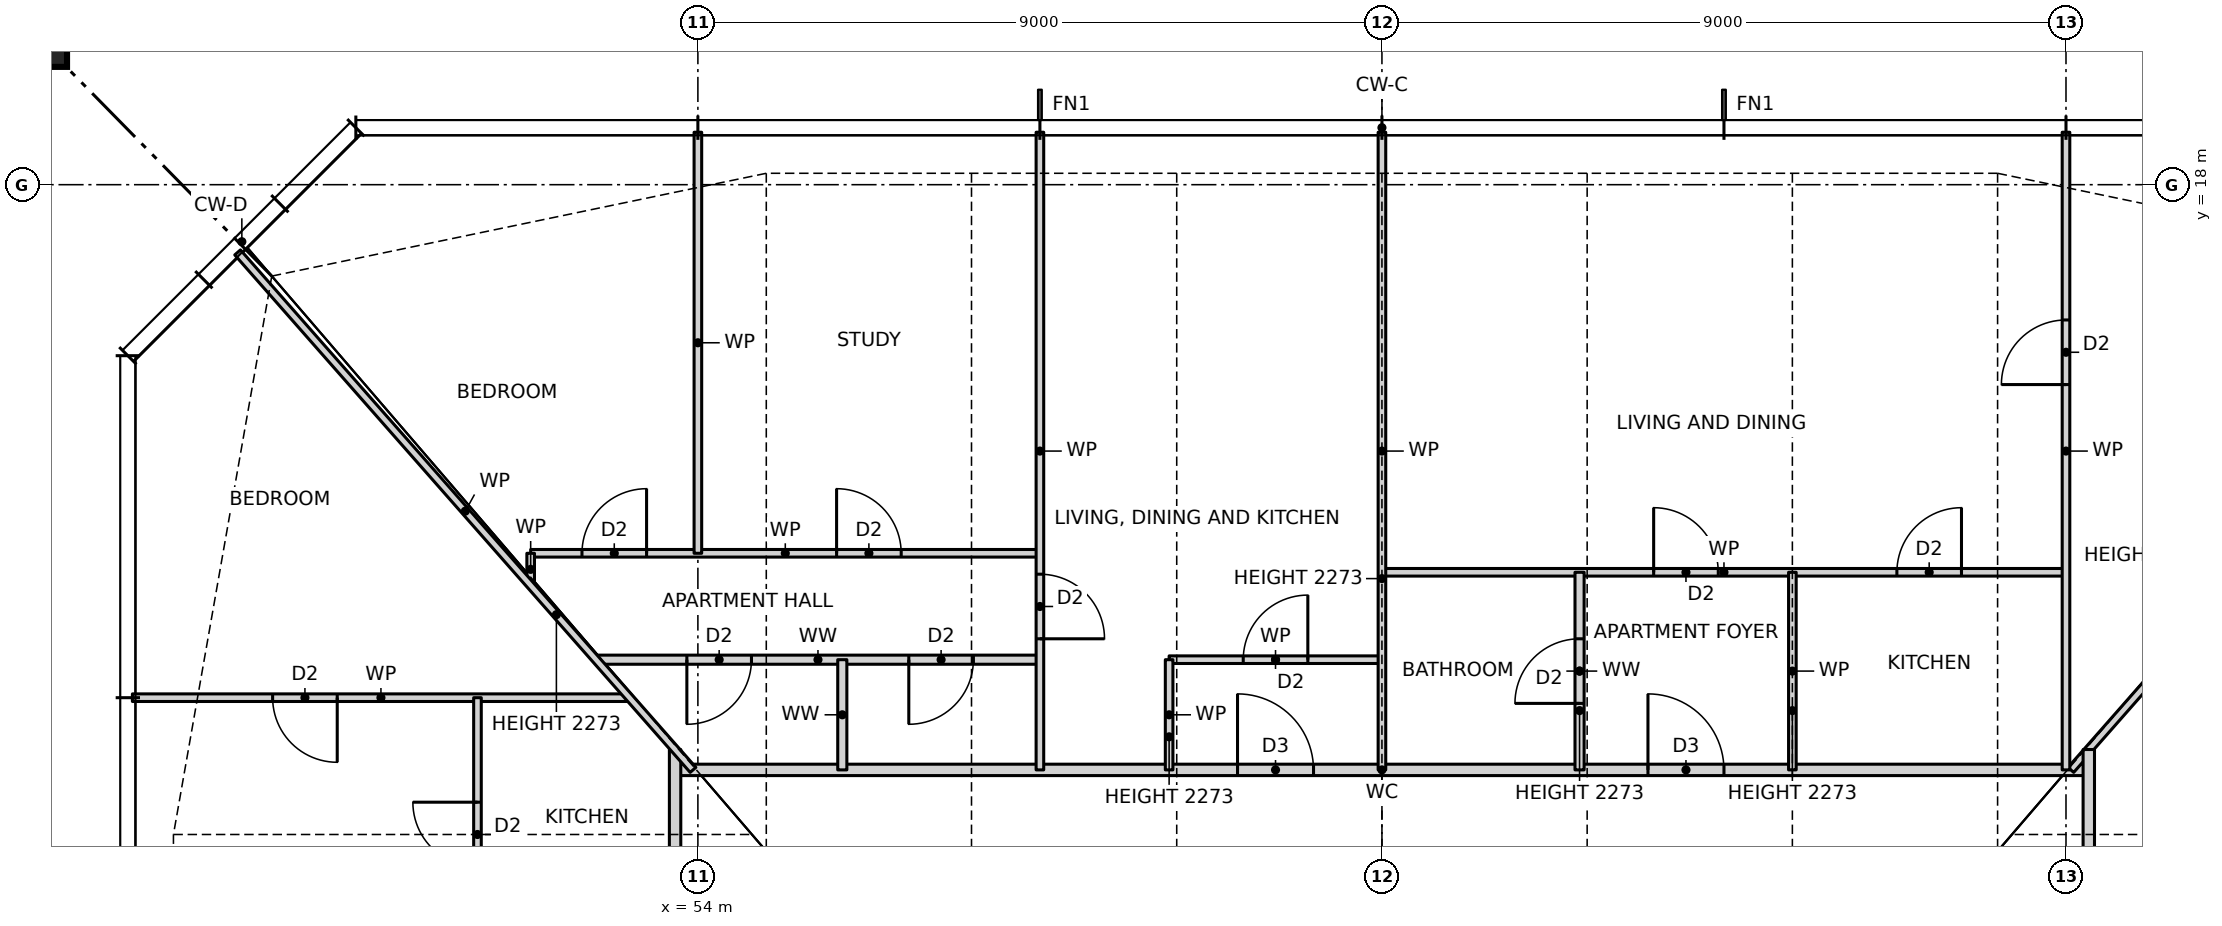
"""IFC4 building model, lengths in metres.
Left out: names, types, materials, properties, quantities, classifications, styles, units other than length and angle.
Written with IfcOpenShell. Run it as: python <this file> out.ifc"""

import sys

from ifc_helpers import new_model, si_unit, direction, frame, frame_2d, origin, origin_2d, place, context, subcontext, project, spatial, rectangle, hollow_rectangle, extrude, element, fill, save


model = new_model("IFC4")
c1 = context("Model", 3, precision=1e-05, world=origin(), true_north=direction((0.0, 1.0)))
c2 = subcontext(c1, "Body", "Model", "MODEL_VIEW")
j1 = project(units=[si_unit("LENGTHUNIT", "METRE"), si_unit("PLANEANGLEUNIT", "RADIAN")], contexts=[c1])
p1 = place(None, origin())
s1 = spatial("IfcSite", under=j1, at=p1, CompositionType="ELEMENT")
p2 = place(p1, origin())
s2 = spatial("IfcBuilding", under=s1, at=p2, CompositionType="ELEMENT")
p3 = place(p2, frame((0.0, 0.0, 71.0)))
s3 = spatial("IfcBuildingStorey", under=s2, at=p3, CompositionType="ELEMENT", Elevation=71.0)
p4 = place(p3, frame((45.1, 20.15, 0.0), z_axis=(0.0, 0.0, 1.0), x_axis=(1.0, 0.0, 0.0)))
e1 = element("IfcColumn", 1, at=p4, inside=s3, PredefinedType="COLUMN", context=c2, shape_type="SweptSolid", body=[
    extrude(hollow_rectangle(XDim=1.2, YDim=1.2, WallThickness=0.07, at=origin_2d()), origin(), (0.0, 0.0, 1.0), 3.5),
])
p5 = place(p3, frame((53.7, 10.3, 0.0), z_axis=(0.0, 0.0, 1.0), x_axis=(1.0, 0.0, 0.0)))
e2 = element("IfcWall", 2, at=p5, inside=s3, PredefinedType="PARTITIONING", context=c2, shape_type="SweptSolid", body=[
    extrude(rectangle(XDim=18.6, YDim=0.15, at=frame_2d((9.3, 0.0))), origin(), (0.0, 0.0, 1.0), 3.2),
])
p6 = place(p5, frame((12.8, 0.0, 0.0)))
e3 = element("IfcOpeningElement", 3, at=p6, cuts=e2, PredefinedType="OPENING", context=c2, shape_type="SweptSolid", body=[
    extrude(rectangle(XDim=1.0, YDim=2.1, at=frame_2d((0.5, 1.05))), frame((0.0, 0.085, 0.0), z_axis=(0.0, -1.0, 0.0), x_axis=(1.0, 0.0, 0.0)), (0.0, 0.0, 1.0), 0.17),
])
p7 = place(p5, frame((7.4, 0.0, 0.0)))
e4 = element("IfcOpeningElement", 4, at=p7, cuts=e2, PredefinedType="OPENING", context=c2, shape_type="SweptSolid", body=[
    extrude(rectangle(XDim=1.0, YDim=2.1, at=frame_2d((0.5, 1.05))), frame((0.0, 0.085, 0.0), z_axis=(0.0, -1.0, 0.0), x_axis=(1.0, 0.0, 0.0)), (0.0, 0.0, 1.0), 0.17),
])
p8 = place(p3, frame((46.56, 11.25, 0.0), z_axis=(0.0, 0.0, 1.0), x_axis=(1.0, 0.0, 0.0)))
e5 = element("IfcWall", 5, at=p8, inside=s3, PredefinedType="PARTITIONING", context=c2, shape_type="SweptSolid", body=[
    extrude(rectangle(XDim=6.54, YDim=0.1, at=frame_2d((3.27, 0.0))), origin(), (0.0, 0.0, 1.0), 3.2),
])
p9 = place(p8, frame((1.845, 0.0, 0.0)))
e6 = element("IfcOpeningElement", 6, at=p9, cuts=e5, PredefinedType="OPENING", context=c2, shape_type="SweptSolid", body=[
    extrude(rectangle(XDim=0.85, YDim=2.1, at=frame_2d((0.425, 1.05))), frame((0.0, 0.06, 0.0), z_axis=(0.0, -1.0, 0.0), x_axis=(1.0, 0.0, 0.0)), (0.0, 0.0, 1.0), 0.12),
])
p10 = place(p3, frame((52.66, 11.75, 0.0), z_axis=(0.0, 0.0, 1.0), x_axis=(1.0, 0.0, 0.0)))
e7 = element("IfcWall", 7, at=p10, inside=s3, PredefinedType="PARTITIONING", context=c2, shape_type="SweptSolid", body=[
    extrude(rectangle(XDim=5.84, YDim=0.12, at=frame_2d((2.92, 0.0))), origin(), (0.0, 0.0, 1.0), 3.2),
])
p11 = place(p10, frame((4.115, 0.0, 0.0)))
e8 = element("IfcOpeningElement", 8, at=p11, cuts=e7, PredefinedType="OPENING", context=c2, shape_type="SweptSolid", body=[
    extrude(rectangle(XDim=0.85, YDim=2.1, at=frame_2d((0.425, 1.05))), frame((0.0, 0.07, 0.0), z_axis=(0.0, -1.0, 0.0), x_axis=(1.0, 0.0, 0.0)), (0.0, 0.0, 1.0), 0.14),
])
p12 = place(p10, frame((1.195, 0.0, 0.0)))
e9 = element("IfcOpeningElement", 9, at=p12, cuts=e7, PredefinedType="OPENING", context=c2, shape_type="SweptSolid", body=[
    extrude(rectangle(XDim=0.85, YDim=2.1, at=frame_2d((0.425, 1.05))), frame((0.0, 0.07, 0.0), z_axis=(0.0, -1.0, 0.0), x_axis=(1.0, 0.0, 0.0)), (0.0, 0.0, 1.0), 0.14),
])
p13 = place(p3, frame((60.2, 11.75, 0.0), z_axis=(0.0, 0.0, 1.0), x_axis=(1.0, 0.0, 0.0)))
e10 = element("IfcWall", 10, at=p13, inside=s3, PredefinedType="PARTITIONING", context=c2, shape_type="SweptSolid", body=[
    extrude(rectangle(XDim=2.8, YDim=0.1, at=frame_2d((1.4, 0.0))), origin(), (0.0, 0.0, 1.0), 3.2),
])
p14 = place(p13, frame((0.975, 0.0, 0.0)))
e11 = element("IfcOpeningElement", 11, at=p14, cuts=e10, PredefinedType="OPENING", context=c2, shape_type="SweptSolid", body=[
    extrude(rectangle(XDim=0.85, YDim=2.1, at=frame_2d((0.425, 1.05))), frame((0.0, 0.06, 0.0), z_axis=(0.0, -1.0, 0.0), x_axis=(1.0, 0.0, 0.0)), (0.0, 0.0, 1.0), 0.12),
])
p15 = place(p3, frame((63.0, 12.9, 0.0), z_axis=(0.0, 0.0, 1.0), x_axis=(1.0, 0.0, 0.0)))
e12 = element("IfcWall", 12, at=p15, inside=s3, PredefinedType="PARTITIONING", context=c2, shape_type="SweptSolid", body=[
    extrude(rectangle(XDim=9.0, YDim=0.1, at=frame_2d((4.5, 0.0))), origin(), (0.0, 0.0, 1.0), 3.2),
])
p16 = place(p15, frame((6.775, 0.0, 0.0)))
e13 = element("IfcOpeningElement", 13, at=p16, cuts=e12, PredefinedType="OPENING", context=c2, shape_type="SweptSolid", body=[
    extrude(rectangle(XDim=0.85, YDim=2.1, at=frame_2d((0.425, 1.05))), frame((0.0, 0.06, 0.0), z_axis=(0.0, -1.0, 0.0), x_axis=(1.0, 0.0, 0.0)), (0.0, 0.0, 1.0), 0.12),
])
p17 = place(p15, frame((3.575, 0.0, 0.0)))
e14 = element("IfcOpeningElement", 14, at=p17, cuts=e12, PredefinedType="OPENING", context=c2, shape_type="SweptSolid", body=[
    extrude(rectangle(XDim=0.85, YDim=2.1, at=frame_2d((0.425, 1.05))), frame((0.0, 0.06, 0.0), z_axis=(0.0, -1.0, 0.0), x_axis=(1.0, 0.0, 0.0)), (0.0, 0.0, 1.0), 0.12),
])
p18 = place(p3, frame((51.8, 13.15, 0.0), z_axis=(0.0, 0.0, 1.0), x_axis=(1.0, 0.0, 0.0)))
e15 = element("IfcWall", 15, at=p18, inside=s3, PredefinedType="PARTITIONING", context=c2, shape_type="SweptSolid", body=[
    extrude(rectangle(XDim=6.7, YDim=0.1, at=frame_2d((3.35, 0.0))), origin(), (0.0, 0.0, 1.0), 3.2),
])
p19 = place(p18, frame((4.025, 0.0, 0.0)))
e16 = element("IfcOpeningElement", 16, at=p19, cuts=e15, PredefinedType="OPENING", context=c2, shape_type="SweptSolid", body=[
    extrude(rectangle(XDim=0.85, YDim=2.1, at=frame_2d((0.425, 1.05))), frame((0.0, 0.06, 0.0), z_axis=(0.0, -1.0, 0.0), x_axis=(1.0, 0.0, 0.0)), (0.0, 0.0, 1.0), 0.12),
])
p20 = place(p18, frame((0.675, 0.0, 0.0)))
e17 = element("IfcOpeningElement", 17, at=p20, cuts=e15, PredefinedType="OPENING", context=c2, shape_type="SweptSolid", body=[
    extrude(rectangle(XDim=0.85, YDim=2.1, at=frame_2d((0.425, 1.05))), frame((0.0, 0.06, 0.0), z_axis=(0.0, -1.0, 0.0), x_axis=(1.0, 0.0, 0.0)), (0.0, 0.0, 1.0), 0.12),
])
p21 = place(p3, frame((72.064, 10.3, 0.0), z_axis=(0.0, 0.0, 1.0), x_axis=(0.660700699661, 0.750649442461, 0.0)))
e18 = element("IfcWall", 18, at=p21, inside=s3, PredefinedType="PARTITIONING", context=c2, shape_type="SweptSolid", body=[
    extrude(rectangle(XDim=9.071, YDim=0.1, at=frame_2d((4.535, 0.0))), origin(), (0.0, 0.0, 1.0), 2.273),
])
p22 = place(p3, frame((72.3, -10.568, 0.0), z_axis=(0.0, 0.0, 1.0), x_axis=(0.0, 1.0, 0.0)))
e19 = element("IfcWall", 19, at=p22, inside=s3, PredefinedType="PARTITIONING", context=c2, shape_type="SweptSolid", body=[
    extrude(rectangle(XDim=21.136, YDim=0.15, at=frame_2d((10.568, 0.0))), origin(), (0.0, 0.0, 1.0), 3.2),
])
p23 = place(p22, frame((10.068, 0.0, 0.0)))
e20 = element("IfcOpeningElement", 20, at=p23, cuts=e19, PredefinedType="OPENING", context=c2, shape_type="SweptSolid", body=[
    extrude(rectangle(XDim=1.0, YDim=2.1, at=frame_2d((0.5, 1.05))), frame((0.0, 0.085, 0.0), z_axis=(0.0, -1.0, 0.0), x_axis=(1.0, 0.0, 0.0)), (0.0, 0.0, 1.0), 0.17),
])
p24 = place(p3, frame((72.0, 10.3, 0.0), z_axis=(0.0, 0.0, 1.0), x_axis=(0.0, 1.0, 0.0)))
e21 = element("IfcWall", 21, at=p24, inside=s3, PredefinedType="PARTITIONING", context=c2, shape_type="SweptSolid", body=[
    extrude(rectangle(XDim=8.39, YDim=0.1, at=frame_2d((4.195, 0.0))), origin(), (0.0, 0.0, 1.0), 3.2),
])
p25 = place(p24, frame((5.07, 0.0, 0.0)))
e22 = element("IfcOpeningElement", 22, at=p25, cuts=e21, PredefinedType="OPENING", context=c2, shape_type="SweptSolid", body=[
    extrude(rectangle(XDim=0.85, YDim=2.1, at=frame_2d((0.425, 1.05))), frame((0.0, 0.06, 0.0), z_axis=(0.0, -1.0, 0.0), x_axis=(1.0, 0.0, 0.0)), (0.0, 0.0, 1.0), 0.12),
])
p26 = place(p3, frame((68.4, 10.3, 0.0), z_axis=(0.0, 0.0, 1.0), x_axis=(0.0, 1.0, 0.0)))
e23 = element("IfcWall", 23, at=p26, inside=s3, PredefinedType="PARTITIONING", context=c2, shape_type="SweptSolid", body=[
    extrude(rectangle(XDim=2.6, YDim=0.1, at=frame_2d((1.3, 0.0))), origin(), (0.0, 0.0, 1.0), 2.273),
])
p27 = place(p3, frame((65.6, 10.3, 0.0), z_axis=(0.0, 0.0, 1.0), x_axis=(0.0, 1.0, 0.0)))
e24 = element("IfcWall", 24, at=p27, inside=s3, PredefinedType="PARTITIONING", context=c2, shape_type="SweptSolid", body=[
    extrude(rectangle(XDim=2.6, YDim=0.12, at=frame_2d((1.3, 0.0))), origin(), (0.0, 0.0, 1.0), 2.273),
])
p28 = place(p27, frame((0.875, 0.0, 0.0)))
e25 = element("IfcOpeningElement", 25, at=p28, cuts=e24, PredefinedType="OPENING", context=c2, shape_type="SweptSolid", body=[
    extrude(rectangle(XDim=0.85, YDim=2.1, at=frame_2d((0.425, 1.05))), frame((0.0, 0.07, 0.0), z_axis=(0.0, -1.0, 0.0), x_axis=(1.0, 0.0, 0.0)), (0.0, 0.0, 1.0), 0.14),
])
p29 = place(p3, frame((63.0, 10.3, 0.0), z_axis=(0.0, 0.0, 1.0), x_axis=(0.0, 1.0, 0.0)))
e26 = element("IfcWall", 26, at=p29, inside=s3, PredefinedType="PARTITIONING", context=c2, shape_type="SweptSolid", body=[
    extrude(rectangle(XDim=8.39, YDim=0.1, at=frame_2d((4.195, 0.0))), origin(), (0.0, 0.0, 1.0), 2.273),
])
p30 = place(p3, frame((60.2, 10.3, 0.0), z_axis=(0.0, 0.0, 1.0), x_axis=(0.0, 1.0, 0.0)))
e27 = element("IfcWall", 27, at=p30, inside=s3, PredefinedType="PARTITIONING", context=c2, shape_type="SweptSolid", body=[
    extrude(rectangle(XDim=1.45, YDim=0.1, at=frame_2d((0.725, 0.0))), origin(), (0.0, 0.0, 1.0), 2.273),
])
p31 = place(p3, frame((58.5, 10.3, 0.0), z_axis=(0.0, 0.0, 1.0), x_axis=(0.0, 1.0, 0.0)))
e28 = element("IfcWall", 28, at=p31, inside=s3, PredefinedType="PARTITIONING", context=c2, shape_type="SweptSolid", body=[
    extrude(rectangle(XDim=8.39, YDim=0.1, at=frame_2d((4.195, 0.0))), origin(), (0.0, 0.0, 1.0), 3.2),
])
p32 = place(p31, frame((1.725, 0.0, 0.0)))
e29 = element("IfcOpeningElement", 29, at=p32, cuts=e28, PredefinedType="OPENING", context=c2, shape_type="SweptSolid", body=[
    extrude(rectangle(XDim=0.85, YDim=2.1, at=frame_2d((0.425, 1.05))), frame((0.0, 0.06, 0.0), z_axis=(0.0, -1.0, 0.0), x_axis=(1.0, 0.0, 0.0)), (0.0, 0.0, 1.0), 0.12),
])
p33 = place(p3, frame((55.9, 10.3, 0.0), z_axis=(0.0, 0.0, 1.0), x_axis=(0.0, 1.0, 0.0)))
e30 = element("IfcWall", 30, at=p33, inside=s3, PredefinedType="PARTITIONING", context=c2, shape_type="SweptSolid", body=[
    extrude(rectangle(XDim=1.45, YDim=0.12, at=frame_2d((0.725, 0.0))), origin(), (0.0, 0.0, 1.0), 3.2),
])
p34 = place(p3, frame((54.0, 13.15, 0.0), z_axis=(0.0, 0.0, 1.0), x_axis=(0.0, 1.0, 0.0)))
e31 = element("IfcWall", 31, at=p34, inside=s3, PredefinedType="PARTITIONING", context=c2, shape_type="SweptSolid", body=[
    extrude(rectangle(XDim=5.54, YDim=0.1, at=frame_2d((2.77, 0.0))), origin(), (0.0, 0.0, 1.0), 3.2),
])
p35 = place(p3, frame((53.7, -10.568, 0.0), z_axis=(0.0, 0.0, 1.0), x_axis=(0.0, 1.0, 0.0)))
e32 = element("IfcWall", 32, at=p35, inside=s3, PredefinedType="PARTITIONING", context=c2, shape_type="SweptSolid", body=[
    extrude(rectangle(XDim=21.136, YDim=0.15, at=frame_2d((10.568, 0.0))), origin(), (0.0, 0.0, 1.0), 3.2),
])
p36 = place(p35, frame((16.318, 0.0, 0.0)))
e33 = element("IfcOpeningElement", 33, at=p36, cuts=e32, PredefinedType="OPENING", context=c2, shape_type="SweptSolid", body=[
    extrude(rectangle(XDim=1.0, YDim=2.1, at=frame_2d((0.5, 1.05))), frame((0.0, 0.085, 0.0), z_axis=(0.0, -1.0, 0.0), x_axis=(1.0, 0.0, 0.0)), (0.0, 0.0, 1.0), 0.17),
])
p37 = place(p35, frame((10.918, 0.0, 0.0)))
e34 = element("IfcOpeningElement", 34, at=p37, cuts=e32, PredefinedType="OPENING", context=c2, shape_type="SweptSolid", body=[
    extrude(rectangle(XDim=1.0, YDim=2.1, at=frame_2d((0.5, 1.05))), frame((0.0, 0.085, 0.0), z_axis=(0.0, -1.0, 0.0), x_axis=(1.0, 0.0, 0.0)), (0.0, 0.0, 1.0), 0.17),
])
p38 = place(p3, frame((51.8, 12.727, 0.0), z_axis=(0.0, 0.0, 1.0), x_axis=(0.0, 1.0, 0.0)))
e35 = element("IfcWall", 35, at=p38, inside=s3, PredefinedType="PARTITIONING", context=c2, shape_type="SweptSolid", body=[
    extrude(rectangle(XDim=0.423, YDim=0.1, at=frame_2d((0.211, 0.0))), origin(), (0.0, 0.0, 1.0), 3.2),
])
p39 = place(p3, frame((51.1, 2.25, 0.0), z_axis=(0.0, 0.0, 1.0), x_axis=(0.0, 1.0, 0.0)))
e36 = element("IfcWall", 36, at=p39, inside=s3, PredefinedType="PARTITIONING", context=c2, shape_type="SweptSolid", body=[
    extrude(rectangle(XDim=9.0, YDim=0.1, at=frame_2d((4.5, 0.0))), origin(), (0.0, 0.0, 1.0), 3.2),
])
p40 = place(p39, frame((6.775, 0.0, 0.0)))
e37 = element("IfcOpeningElement", 37, at=p40, cuts=e36, PredefinedType="OPENING", context=c2, shape_type="SweptSolid", body=[
    extrude(rectangle(XDim=0.85, YDim=2.1, at=frame_2d((0.425, 1.05))), frame((0.0, 0.06, 0.0), z_axis=(0.0, -1.0, 0.0), x_axis=(1.0, 0.0, 0.0)), (0.0, 0.0, 1.0), 0.12),
])
p41 = place(p39, frame((3.575, 0.0, 0.0)))
e38 = element("IfcOpeningElement", 38, at=p41, cuts=e36, PredefinedType="OPENING", context=c2, shape_type="SweptSolid", body=[
    extrude(rectangle(XDim=0.85, YDim=2.1, at=frame_2d((0.425, 1.05))), frame((0.0, 0.06, 0.0), z_axis=(0.0, -1.0, 0.0), x_axis=(1.0, 0.0, 0.0)), (0.0, 0.0, 1.0), 0.12),
])
p42 = place(p3, frame((53.936, 10.3, 0.0), z_axis=(0.0, 0.0, 1.0), x_axis=(-0.660638210404, 0.750704439146, 0.0)))
e39 = element("IfcWall", 39, at=p42, inside=s3, PredefinedType="PARTITIONING", context=c2, shape_type="SweptSolid", body=[
    extrude(rectangle(XDim=9.07, YDim=0.1, at=frame_2d((4.535, 0.0))), origin(), (0.0, 0.0, 1.0), 2.273),
])
p43 = place(p16, origin())
e40 = element("IfcDoor", 40, at=p43, inside=s3, OperationType="SINGLE_SWING_RIGHT", PredefinedType="DOOR", context=c2, shape_type="SweptSolid", body=[
    extrude(rectangle(XDim=0.85, YDim=2.1, at=frame_2d((0.425, 1.05))), frame((0.0, 0.025, 0.0), z_axis=(0.0, -1.0, 0.0), x_axis=(1.0, 0.0, 0.0)), (0.0, 0.0, 1.0), 0.05),
])
fill(e13, e40)
p44 = place(p6, origin())
e41 = element("IfcDoor", 41, at=p44, inside=s3, OperationType="SINGLE_SWING_LEFT", PredefinedType="DOOR", context=c2, shape_type="SweptSolid", body=[
    extrude(rectangle(XDim=1.0, YDim=2.1, at=frame_2d((0.5, 1.05))), frame((0.0, 0.025, 0.0), z_axis=(0.0, -1.0, 0.0), x_axis=(1.0, 0.0, 0.0)), (0.0, 0.0, 1.0), 0.05),
])
fill(e3, e41)
p45 = place(p17, origin())
e42 = element("IfcDoor", 42, at=p45, inside=s3, OperationType="SINGLE_SWING_LEFT", PredefinedType="DOOR", context=c2, shape_type="SweptSolid", body=[
    extrude(rectangle(XDim=0.85, YDim=2.1, at=frame_2d((0.425, 1.05))), frame((0.0, 0.025, 0.0), z_axis=(0.0, -1.0, 0.0), x_axis=(1.0, 0.0, 0.0)), (0.0, 0.0, 1.0), 0.05),
])
fill(e14, e42)
p46 = place(p28, origin())
e43 = element("IfcDoor", 43, at=p46, inside=s3, OperationType="SINGLE_SWING_LEFT", PredefinedType="DOOR", context=c2, shape_type="SweptSolid", body=[
    extrude(rectangle(XDim=0.85, YDim=2.1, at=frame_2d((0.425, 1.05))), frame((0.0, 0.025, 0.0), z_axis=(0.0, -1.0, 0.0), x_axis=(1.0, 0.0, 0.0)), (0.0, 0.0, 1.0), 0.05),
])
fill(e25, e43)
p47 = place(p25, origin())
e44 = element("IfcDoor", 44, at=p47, inside=s3, OperationType="SINGLE_SWING_LEFT", PredefinedType="DOOR", context=c2, shape_type="SweptSolid", body=[
    extrude(rectangle(XDim=0.85, YDim=2.1, at=frame_2d((0.425, 1.05))), frame((0.0, 0.025, 0.0), z_axis=(0.0, -1.0, 0.0), x_axis=(1.0, 0.0, 0.0)), (0.0, 0.0, 1.0), 0.05),
])
fill(e22, e44)
p48 = place(p7, origin())
e45 = element("IfcDoor", 45, at=p48, inside=s3, OperationType="SINGLE_SWING_LEFT", PredefinedType="DOOR", context=c2, shape_type="SweptSolid", body=[
    extrude(rectangle(XDim=1.0, YDim=2.1, at=frame_2d((0.5, 1.05))), frame((0.0, 0.025, 0.0), z_axis=(0.0, -1.0, 0.0), x_axis=(1.0, 0.0, 0.0)), (0.0, 0.0, 1.0), 0.05),
])
fill(e4, e45)
p49 = place(p14, origin())
e46 = element("IfcDoor", 46, at=p49, inside=s3, OperationType="SINGLE_SWING_RIGHT", PredefinedType="DOOR", context=c2, shape_type="SweptSolid", body=[
    extrude(rectangle(XDim=0.85, YDim=2.1, at=frame_2d((0.425, 1.05))), frame((0.0, 0.025, 0.0), z_axis=(0.0, -1.0, 0.0), x_axis=(1.0, 0.0, 0.0)), (0.0, 0.0, 1.0), 0.05),
])
fill(e11, e46)
p50 = place(p32, frame((0.85, 0.0, 0.0), z_axis=(0.0, 0.0, 1.0), x_axis=(-1.0, 0.0, 0.0)))
e47 = element("IfcDoor", 47, at=p50, inside=s3, OperationType="SINGLE_SWING_RIGHT", PredefinedType="DOOR", context=c2, shape_type="SweptSolid", body=[
    extrude(rectangle(XDim=0.85, YDim=2.1, at=frame_2d((0.425, 1.05))), frame((0.0, 0.025, 0.0), z_axis=(0.0, -1.0, 0.0), x_axis=(1.0, 0.0, 0.0)), (0.0, 0.0, 1.0), 0.05),
])
fill(e29, e47)
p51 = place(p19, origin())
e48 = element("IfcDoor", 48, at=p51, inside=s3, OperationType="SINGLE_SWING_LEFT", PredefinedType="DOOR", context=c2, shape_type="SweptSolid", body=[
    extrude(rectangle(XDim=0.85, YDim=2.1, at=frame_2d((0.425, 1.05))), frame((0.0, 0.025, 0.0), z_axis=(0.0, -1.0, 0.0), x_axis=(1.0, 0.0, 0.0)), (0.0, 0.0, 1.0), 0.05),
])
fill(e16, e48)
p52 = place(p20, origin())
e49 = element("IfcDoor", 49, at=p52, inside=s3, OperationType="SINGLE_SWING_RIGHT", PredefinedType="DOOR", context=c2, shape_type="SweptSolid", body=[
    extrude(rectangle(XDim=0.85, YDim=2.1, at=frame_2d((0.425, 1.05))), frame((0.0, 0.025, 0.0), z_axis=(0.0, -1.0, 0.0), x_axis=(1.0, 0.0, 0.0)), (0.0, 0.0, 1.0), 0.05),
])
fill(e17, e49)
p53 = place(p11, frame((0.85, 0.0, 0.0), z_axis=(0.0, 0.0, 1.0), x_axis=(-1.0, 0.0, 0.0)))
e50 = element("IfcDoor", 50, at=p53, inside=s3, OperationType="SINGLE_SWING_RIGHT", PredefinedType="DOOR", context=c2, shape_type="SweptSolid", body=[
    extrude(rectangle(XDim=0.85, YDim=2.1, at=frame_2d((0.425, 1.05))), frame((0.0, 0.025, 0.0), z_axis=(0.0, -1.0, 0.0), x_axis=(1.0, 0.0, 0.0)), (0.0, 0.0, 1.0), 0.05),
])
fill(e8, e50)
p54 = place(p12, frame((0.85, 0.0, 0.0), z_axis=(0.0, 0.0, 1.0), x_axis=(-1.0, 0.0, 0.0)))
e51 = element("IfcDoor", 51, at=p54, inside=s3, OperationType="SINGLE_SWING_RIGHT", PredefinedType="DOOR", context=c2, shape_type="SweptSolid", body=[
    extrude(rectangle(XDim=0.85, YDim=2.1, at=frame_2d((0.425, 1.05))), frame((0.0, 0.025, 0.0), z_axis=(0.0, -1.0, 0.0), x_axis=(1.0, 0.0, 0.0)), (0.0, 0.0, 1.0), 0.05),
])
fill(e9, e51)
p55 = place(p40, origin())
e52 = element("IfcDoor", 52, at=p55, inside=s3, OperationType="SINGLE_SWING_RIGHT", PredefinedType="DOOR", context=c2, shape_type="SweptSolid", body=[
    extrude(rectangle(XDim=0.85, YDim=2.1, at=frame_2d((0.425, 1.05))), frame((0.0, 0.025, 0.0), z_axis=(0.0, -1.0, 0.0), x_axis=(1.0, 0.0, 0.0)), (0.0, 0.0, 1.0), 0.05),
])
fill(e37, e52)
p56 = place(p9, frame((0.85, 0.0, 0.0), z_axis=(0.0, 0.0, 1.0), x_axis=(-1.0, 0.0, 0.0)))
e53 = element("IfcDoor", 53, at=p56, inside=s3, OperationType="SINGLE_SWING_LEFT", PredefinedType="DOOR", context=c2, shape_type="SweptSolid", body=[
    extrude(rectangle(XDim=0.85, YDim=2.1, at=frame_2d((0.425, 1.05))), frame((0.0, 0.025, 0.0), z_axis=(0.0, -1.0, 0.0), x_axis=(1.0, 0.0, 0.0)), (0.0, 0.0, 1.0), 0.05),
])
fill(e6, e53)
save(model, sys.argv[1])
